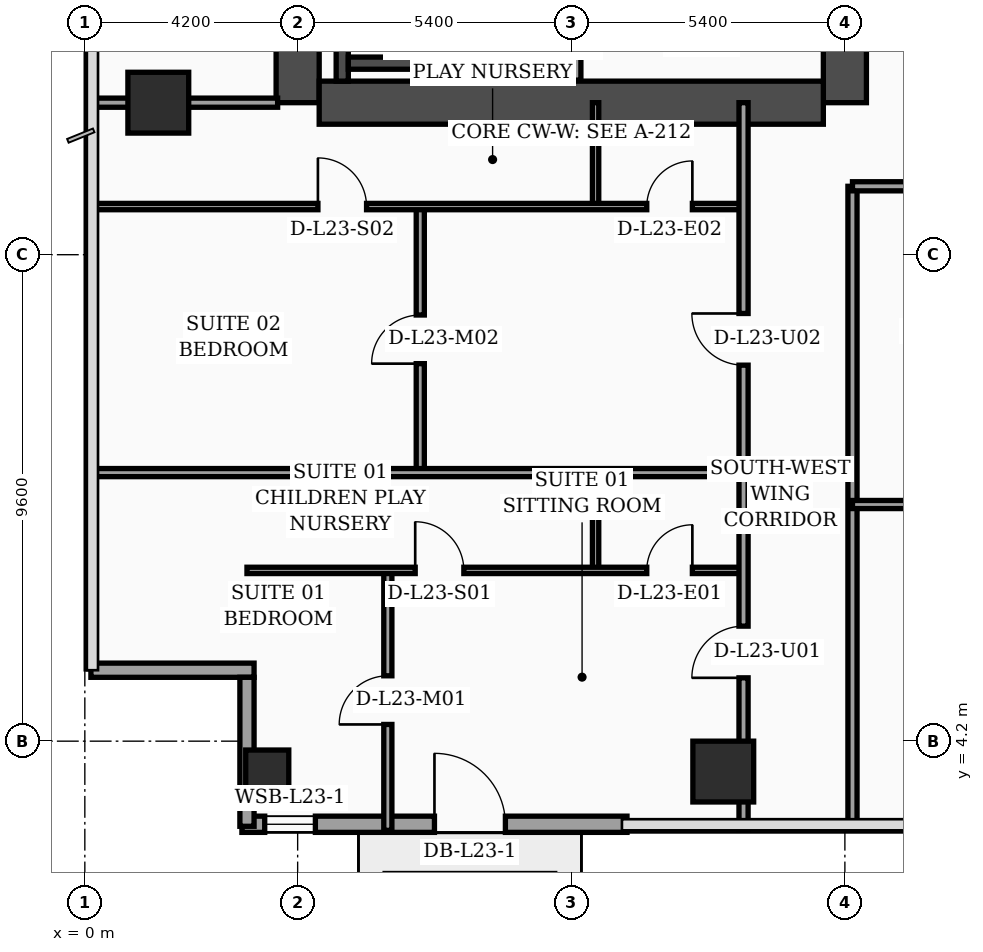
"""IFC4 building model, lengths in metres.
Left out: names, types, materials, properties, quantities, classifications, styles, units other than length and angle.
Written with IfcOpenShell. Run it as: python <this file> out.ifc"""

import sys

from ifc_helpers import new_model, si_unit, direction, frame, frame_2d, origin, origin_2d, place, context, subcontext, project, spatial, rectangle, hollow_rectangle, extrude, element, fill, save


model = new_model("IFC4")
c1 = context("Model", 3, precision=1e-05, world=origin(), true_north=direction((0.0, 1.0)))
c2 = subcontext(c1, "Body", "Model", "MODEL_VIEW")
j1 = project(units=[si_unit("LENGTHUNIT", "METRE"), si_unit("PLANEANGLEUNIT", "RADIAN")], contexts=[c1])
p1 = place(None, origin())
s1 = spatial("IfcSite", under=j1, at=p1, CompositionType="ELEMENT")
p2 = place(p1, origin())
s2 = spatial("IfcBuilding", under=s1, at=p2, CompositionType="ELEMENT")
p3 = place(p2, frame((0.0, 0.0, 97.4)))
s3 = spatial("IfcBuildingStorey", under=s2, at=p3, CompositionType="ELEMENT", Elevation=97.4)
p4 = place(p3, frame((4.2, 16.8, 0.0), z_axis=(0.0, 0.0, 1.0), x_axis=(0.0, 1.0, 0.0)))
e1 = element("IfcWall", 1, at=p4, inside=s3, PredefinedType="SHEAR", context=c2, shape_type="SweptSolid", body=[
    extrude(rectangle(XDim=21.6, YDim=0.85, at=frame_2d((10.8, 0.0))), origin(), (0.0, 0.0, 1.0), 3.56),
])
p5 = place(p3, frame((15.0, 16.8, 0.0), z_axis=(0.0, 0.0, 1.0), x_axis=(0.0, 1.0, 0.0)))
e2 = element("IfcWall", 2, at=p5, inside=s3, PredefinedType="SHEAR", context=c2, shape_type="SweptSolid", body=[
    extrude(rectangle(XDim=21.6, YDim=0.85, at=frame_2d((10.8, 0.0))), origin(), (0.0, 0.0, 1.0), 3.56),
])
p6 = place(p5, frame((8.65, 0.0, 0.0)))
e3 = element("IfcOpeningElement", 3, at=p6, cuts=e2, PredefinedType="OPENING", context=c2, shape_type="SweptSolid", body=[
    extrude(rectangle(XDim=1.1, YDim=2.2, at=frame_2d((0.55, 1.1))), frame((0.0, 0.435, 0.0), z_axis=(0.0, -1.0, 0.0), x_axis=(1.0, 0.0, 0.0)), (0.0, 0.0, 1.0), 0.87),
])
p7 = place(p5, frame((10.85, 0.0, 0.0)))
e4 = element("IfcOpeningElement", 4, at=p7, cuts=e2, PredefinedType="OPENING", context=c2, shape_type="SweptSolid", body=[
    extrude(rectangle(XDim=1.1, YDim=2.2, at=frame_2d((0.55, 1.1))), frame((0.0, 0.435, 0.0), z_axis=(0.0, -1.0, 0.0), x_axis=(1.0, 0.0, 0.0)), (0.0, 0.0, 1.0), 0.87),
])
p8 = place(p5, frame((13.5, 0.0, 0.0)))
e5 = element("IfcOpeningElement", 5, at=p8, cuts=e2, PredefinedType="OPENING", context=c2, shape_type="SweptSolid", body=[
    extrude(rectangle(XDim=1.1, YDim=2.2, at=frame_2d((0.55, 1.1))), frame((0.0, 0.435, 0.0), z_axis=(0.0, -1.0, 0.0), x_axis=(1.0, 0.0, 0.0)), (0.0, 0.0, 1.0), 0.87),
])
p9 = place(p5, frame((16.15, 0.0, 0.0)))
e6 = element("IfcOpeningElement", 6, at=p9, cuts=e2, PredefinedType="OPENING", context=c2, shape_type="SweptSolid", body=[
    extrude(rectangle(XDim=1.1, YDim=2.2, at=frame_2d((0.55, 1.1))), frame((0.0, 0.435, 0.0), z_axis=(0.0, -1.0, 0.0), x_axis=(1.0, 0.0, 0.0)), (0.0, 0.0, 1.0), 0.87),
])
p10 = place(p3, frame((4.625, 16.8, 0.0), z_axis=(0.0, 0.0, 1.0), x_axis=(1.0, 0.0, 0.0)))
e7 = element("IfcWall", 7, at=p10, inside=s3, PredefinedType="SHEAR", context=c2, shape_type="SweptSolid", body=[
    extrude(rectangle(XDim=9.95, YDim=0.85, at=frame_2d((4.975, 0.0))), origin(), (0.0, 0.0, 1.0), 3.56),
])
p11 = place(p3, frame((5.08, 17.225, 0.0), z_axis=(0.0, 0.0, 1.0), x_axis=(0.0, 1.0, 0.0)))
e8 = element("IfcWall", 8, at=p11, inside=s3, PredefinedType="SOLIDWALL", context=c2, shape_type="SweptSolid", body=[
    extrude(rectangle(XDim=9.565, YDim=0.24, at=frame_2d((4.782, 0.0))), origin(), (0.0, 0.0, 1.0), 3.56),
])
p12 = place(p3, frame((8.42, 17.225, 0.0), z_axis=(0.0, 0.0, 1.0), x_axis=(0.0, 1.0, 0.0)))
e9 = element("IfcWall", 9, at=p12, inside=s3, PredefinedType="SOLIDWALL", context=c2, shape_type="SweptSolid", body=[
    extrude(rectangle(XDim=9.565, YDim=0.24, at=frame_2d((4.782, 0.0))), origin(), (0.0, 0.0, 1.0), 3.56),
])
p13 = place(p12, frame((0.35, 0.0, 0.0)))
e10 = element("IfcOpeningElement", 10, at=p13, cuts=e9, PredefinedType="OPENING", context=c2, shape_type="SweptSolid", body=[
    extrude(rectangle(XDim=1.15, YDim=2.2, at=frame_2d((0.575, 1.1))), frame((0.0, 0.13, 0.0), z_axis=(0.0, -1.0, 0.0), x_axis=(1.0, 0.0, 0.0)), (0.0, 0.0, 1.0), 0.26),
])
p14 = place(p3, frame((5.2, 17.58, 0.0), z_axis=(0.0, 0.0, 1.0), x_axis=(1.0, 0.0, 0.0)))
e11 = element("IfcWall", 11, at=p14, inside=s3, PredefinedType="SOLIDWALL", context=c2, shape_type="SweptSolid", body=[
    extrude(rectangle(XDim=3.1, YDim=0.24, at=frame_2d((1.55, 0.0))), origin(), (0.0, 0.0, 1.0), 3.56),
])
p15 = place(p3, frame((3.6, 3.6, 0.0), z_axis=(0.0, 0.0, 1.0), x_axis=(1.0, 0.0, 0.0)))
e12 = element("IfcColumn", 12, at=p15, inside=s3, PredefinedType="COLUMN", context=c2, shape_type="SweptSolid", body=[
    extrude(hollow_rectangle(XDim=0.85, YDim=0.85, WallThickness=0.036, at=origin_2d()), origin(), (0.0, 0.0, 1.0), 3.56),
])
for number, where, z_axis, x_axis in (
    (13, (1.45, 16.8, 0.0), (0.0, 0.0, 1.0), (1.0, 0.0, 0.0)),
    (14, (12.6, 3.6, 0.0), (0.0, 0.0, 1.0), (1.0, 0.0, 0.0)),
):
    element("IfcColumn", number, at=place(p3, frame(where, z_axis=z_axis, x_axis=x_axis)), inside=s3, PredefinedType="COLUMN", context=c2, shape_type="SweptSolid", body=[
        extrude(rectangle(XDim=1.2, YDim=1.2, at=origin_2d()), origin(), (0.0, 0.0, 1.0), 3.56),
    ])
p16 = place(p3, frame((3.1, 2.56, 0.0), z_axis=(0.0, 0.0, 1.0), x_axis=(1.0, 0.0, 0.0)))
e15 = element("IfcWall", 15, at=p16, inside=s3, PredefinedType="SOLIDWALL", context=c2, shape_type="SweptSolid", body=[
    extrude(rectangle(XDim=7.6, YDim=0.32, at=frame_2d((3.8, 0.0))), origin(), (0.0, 0.0, 1.0), 3.56),
])
p17 = place(p16, frame((0.45, 0.0, 0.75)))
e16 = element("IfcOpeningElement", 16, at=p17, cuts=e15, PredefinedType="OPENING", context=c2, shape_type="SweptSolid", body=[
    extrude(rectangle(XDim=1.0, YDim=1.6, at=frame_2d((0.5, 0.8))), frame((0.0, 0.17, 0.0), z_axis=(0.0, -1.0, 0.0), x_axis=(1.0, 0.0, 0.0)), (0.0, 0.0, 1.0), 0.34),
])
p18 = place(p16, frame((3.8, 0.0, 0.0)))
e17 = element("IfcOpeningElement", 17, at=p18, cuts=e15, PredefinedType="OPENING", context=c2, shape_type="SweptSolid", body=[
    extrude(rectangle(XDim=1.4, YDim=2.25, at=frame_2d((0.7, 1.125))), frame((0.0, 0.17, 0.0), z_axis=(0.0, -1.0, 0.0), x_axis=(1.0, 0.0, 0.0)), (0.0, 0.0, 1.0), 0.34),
])
p19 = place(p3, frame((0.12, 5.6, 0.0), z_axis=(0.0, 0.0, 1.0), x_axis=(1.0, 0.0, 0.0)))
e18 = element("IfcWall", 18, at=p19, inside=s3, PredefinedType="SOLIDWALL", context=c2, shape_type="SweptSolid", body=[
    extrude(rectangle(XDim=3.22, YDim=0.28, at=frame_2d((1.61, 0.0))), origin(), (0.0, 0.0, 1.0), 2.84),
])
p20 = place(p3, frame((3.2, 5.46, 0.0), z_axis=(0.0, 0.0, 1.0), x_axis=(0.0, -1.0, 0.0)))
e19 = element("IfcWall", 19, at=p20, inside=s3, PredefinedType="SOLIDWALL", context=c2, shape_type="SweptSolid", body=[
    extrude(rectangle(XDim=2.94, YDim=0.28, at=frame_2d((1.47, 0.0))), origin(), (0.0, 0.0, 1.0), 2.84),
])
p21 = place(p3, frame((9.68, 17.245, 0.0), z_axis=(0.0, 0.0, 1.0), x_axis=(0.0, 1.0, 0.0)))
e20 = element("IfcWall", 20, at=p21, inside=s3, PredefinedType="SOLIDWALL", context=c2, shape_type="SweptSolid", body=[
    extrude(rectangle(XDim=7.755, YDim=0.22, at=frame_2d((3.877, 0.0))), origin(), (0.0, 0.0, 1.0), 3.56),
])
p22 = place(p3, frame((0.08, 16.8, 0.0), z_axis=(0.0, 0.0, 1.0), x_axis=(1.0, 0.0, 0.0)))
e21 = element("IfcWall", 21, at=p22, inside=s3, PredefinedType="PARTITIONING", context=c2, shape_type="SweptSolid", body=[
    extrude(rectangle(XDim=3.725, YDim=0.18, at=frame_2d((1.862, 0.0))), origin(), (0.0, 0.0, 1.0), 2.84),
])
p23 = place(p3, frame((10.08, 7.57, 0.0), z_axis=(0.0, 0.0, 1.0), x_axis=(0.0, 1.0, 0.0)))
e22 = element("IfcWall", 22, at=p23, inside=s3, PredefinedType="PARTITIONING", context=c2, shape_type="SweptSolid", body=[
    extrude(rectangle(XDim=1.93, YDim=0.125, at=frame_2d((0.965, 0.0))), origin(), (0.0, 0.0, 1.0), 3.09),
])
p24 = place(p3, frame((5.98, 2.44, 0.0), z_axis=(0.0, 0.0, 1.0), x_axis=(0.0, 1.0, 0.0)))
e23 = element("IfcWall", 23, at=p24, inside=s3, PredefinedType="PARTITIONING", context=c2, shape_type="SweptSolid", body=[
    extrude(rectangle(XDim=5.13, YDim=0.16, at=frame_2d((2.565, 0.0))), origin(), (0.0, 0.0, 1.0), 3.04),
])
p25 = place(p24, frame((2.09, 0.0, 0.0)))
e24 = element("IfcOpeningElement", 24, at=p25, cuts=e23, PredefinedType="OPENING", context=c2, shape_type="SweptSolid", body=[
    extrude(rectangle(XDim=0.96, YDim=2.2, at=frame_2d((0.48, 1.1))), frame((0.0, 0.09, 0.0), z_axis=(0.0, -1.0, 0.0), x_axis=(1.0, 0.0, 0.0)), (0.0, 0.0, 1.0), 0.18),
])
p26 = place(p3, frame((3.2, 7.57, 0.0), z_axis=(0.0, 0.0, 1.0), x_axis=(1.0, 0.0, 0.0)))
e25 = element("IfcWall", 25, at=p26, inside=s3, PredefinedType="PARTITIONING", context=c2, shape_type="SweptSolid", body=[
    extrude(rectangle(XDim=9.8, YDim=0.125, at=frame_2d((4.9, 0.0))), origin(), (0.0, 0.0, 1.0), 2.84),
])
p27 = place(p26, frame((3.32, 0.0, 0.0)))
e26 = element("IfcOpeningElement", 26, at=p27, cuts=e25, PredefinedType="OPENING", context=c2, shape_type="SweptSolid", body=[
    extrude(rectangle(XDim=0.96, YDim=2.2, at=frame_2d((0.48, 1.1))), frame((0.0, 0.073, 0.0), z_axis=(0.0, -1.0, 0.0), x_axis=(1.0, 0.0, 0.0)), (0.0, 0.0, 1.0), 0.145),
])
p28 = place(p26, frame((7.89, 0.0, 0.0)))
e27 = element("IfcOpeningElement", 27, at=p28, cuts=e25, PredefinedType="OPENING", context=c2, shape_type="SweptSolid", body=[
    extrude(rectangle(XDim=0.9, YDim=2.15, at=frame_2d((0.45, 1.075))), frame((0.0, 0.073, 0.0), z_axis=(0.0, -1.0, 0.0), x_axis=(1.0, 0.0, 0.0)), (0.0, 0.0, 1.0), 0.145),
])
p29 = place(p3, frame((10.08, 14.75, 0.0), z_axis=(0.0, 0.0, 1.0), x_axis=(0.0, 1.0, 0.0)))
e28 = element("IfcWall", 28, at=p29, inside=s3, PredefinedType="PARTITIONING", context=c2, shape_type="SweptSolid", body=[
    extrude(rectangle(XDim=2.05, YDim=0.125, at=frame_2d((1.025, 0.0))), origin(), (0.0, 0.0, 1.0), 3.56),
])
p30 = place(p3, frame((6.62, 9.5, 0.0), z_axis=(0.0, 0.0, 1.0), x_axis=(0.0, 1.0, 0.0)))
e29 = element("IfcWall", 29, at=p30, inside=s3, PredefinedType="PARTITIONING", context=c2, shape_type="SweptSolid", body=[
    extrude(rectangle(XDim=5.25, YDim=0.16, at=frame_2d((2.625, 0.0))), origin(), (0.0, 0.0, 1.0), 3.14),
])
p31 = place(p30, frame((2.15, 0.0, 0.0)))
e30 = element("IfcOpeningElement", 30, at=p31, cuts=e29, PredefinedType="OPENING", context=c2, shape_type="SweptSolid", body=[
    extrude(rectangle(XDim=0.96, YDim=2.2, at=frame_2d((0.48, 1.1))), frame((0.0, 0.09, 0.0), z_axis=(0.0, -1.0, 0.0), x_axis=(1.0, 0.0, 0.0)), (0.0, 0.0, 1.0), 0.18),
])
p32 = place(p3, frame((0.08, 14.75, 0.0), z_axis=(0.0, 0.0, 1.0), x_axis=(1.0, 0.0, 0.0)))
e31 = element("IfcWall", 31, at=p32, inside=s3, PredefinedType="PARTITIONING", context=c2, shape_type="SweptSolid", body=[
    extrude(rectangle(XDim=12.92, YDim=0.125, at=frame_2d((6.46, 0.0))), origin(), (0.0, 0.0, 1.0), 2.84),
])
p33 = place(p32, frame((4.52, 0.0, 0.0)))
e32 = element("IfcOpeningElement", 32, at=p33, cuts=e31, PredefinedType="OPENING", context=c2, shape_type="SweptSolid", body=[
    extrude(rectangle(XDim=0.96, YDim=2.2, at=frame_2d((0.48, 1.1))), frame((0.0, 0.073, 0.0), z_axis=(0.0, -1.0, 0.0), x_axis=(1.0, 0.0, 0.0)), (0.0, 0.0, 1.0), 0.145),
])
p34 = place(p32, frame((11.01, 0.0, 0.0)))
e33 = element("IfcOpeningElement", 33, at=p34, cuts=e31, PredefinedType="OPENING", context=c2, shape_type="SweptSolid", body=[
    extrude(rectangle(XDim=0.9, YDim=2.15, at=frame_2d((0.45, 1.075))), frame((0.0, 0.073, 0.0), z_axis=(0.0, -1.0, 0.0), x_axis=(1.0, 0.0, 0.0)), (0.0, 0.0, 1.0), 0.145),
])
p35 = place(p3, frame((0.08, 9.5, 0.0), z_axis=(0.0, 0.0, 1.0), x_axis=(1.0, 0.0, 0.0)))
e34 = element("IfcWall", 34, at=p35, inside=s3, PredefinedType="PARTITIONING", context=c2, shape_type="SweptSolid", body=[
    extrude(rectangle(XDim=12.92, YDim=0.16, at=frame_2d((6.46, 0.0))), origin(), (0.0, 0.0, 1.0), 2.84),
])
p36 = place(p3, frame((13.0, 2.44, 0.0), z_axis=(0.0, 0.0, 1.0), x_axis=(0.0, 1.0, 0.0)))
e35 = element("IfcWall", 35, at=p36, inside=s3, PredefinedType="PARTITIONING", context=c2, shape_type="SweptSolid", body=[
    extrude(rectangle(XDim=14.36, YDim=0.18, at=frame_2d((7.18, 0.0))), origin(), (0.0, 0.0, 1.0), 2.84),
])
p37 = place(p36, frame((3.01, 0.0, 0.0)))
e36 = element("IfcOpeningElement", 36, at=p37, cuts=e35, PredefinedType="OPENING", context=c2, shape_type="SweptSolid", body=[
    extrude(rectangle(XDim=1.02, YDim=2.2, at=frame_2d((0.51, 1.1))), frame((0.0, 0.1, 0.0), z_axis=(0.0, -1.0, 0.0), x_axis=(1.0, 0.0, 0.0)), (0.0, 0.0, 1.0), 0.2),
])
p38 = place(p36, frame((9.18, 0.0, 0.0)))
e37 = element("IfcOpeningElement", 37, at=p38, cuts=e35, PredefinedType="OPENING", context=c2, shape_type="SweptSolid", body=[
    extrude(rectangle(XDim=1.02, YDim=2.2, at=frame_2d((0.51, 1.1))), frame((0.0, 0.1, 0.0), z_axis=(0.0, -1.0, 0.0), x_axis=(1.0, 0.0, 0.0)), (0.0, 0.0, 1.0), 0.2),
])
p39 = place(p3, frame((15.15, 2.44, 0.0), z_axis=(0.0, 0.0, 1.0), x_axis=(0.0, 1.0, 0.0)))
e38 = element("IfcWall", 38, at=p39, inside=s3, PredefinedType="PARTITIONING", context=c2, shape_type="SweptSolid", body=[
    extrude(rectangle(XDim=12.71, YDim=0.18, at=frame_2d((6.355, 0.0))), origin(), (0.0, 0.0, 1.0), 3.04),
])
p40 = place(p3, frame((15.15, 8.87, 0.0), z_axis=(0.0, 0.0, 1.0), x_axis=(1.0, 0.0, 0.0)))
e39 = element("IfcWall", 39, at=p40, inside=s3, PredefinedType="PARTITIONING", context=c2, shape_type="SweptSolid", body=[
    extrude(rectangle(XDim=4.45, YDim=0.16, at=frame_2d((2.225, 0.0))), origin(), (0.0, 0.0, 1.0), 3.56),
])
p41 = place(p40, frame((1.75, 0.0, 0.0)))
e40 = element("IfcOpeningElement", 40, at=p41, cuts=e39, PredefinedType="OPENING", context=c2, shape_type="SweptSolid", body=[
    extrude(rectangle(XDim=0.96, YDim=2.2, at=frame_2d((0.48, 1.1))), frame((0.0, 0.09, 0.0), z_axis=(0.0, -1.0, 0.0), x_axis=(1.0, 0.0, 0.0)), (0.0, 0.0, 1.0), 0.18),
])
p42 = place(p3, frame((15.15, 15.15, 0.0), z_axis=(0.0, 0.0, 1.0), x_axis=(1.0, 0.0, 0.0)))
e41 = element("IfcWall", 41, at=p42, inside=s3, PredefinedType="PARTITIONING", context=c2, shape_type="SweptSolid", body=[
    extrude(rectangle(XDim=6.45, YDim=0.18, at=frame_2d((3.225, 0.0))), origin(), (0.0, 0.0, 1.0), 2.49),
])
p43 = place(p42, frame((1.74, 0.0, 0.0)))
e42 = element("IfcOpeningElement", 42, at=p43, cuts=e41, PredefinedType="OPENING", context=c2, shape_type="SweptSolid", body=[
    extrude(rectangle(XDim=1.02, YDim=2.2, at=frame_2d((0.51, 1.1))), frame((0.0, 0.1, 0.0), z_axis=(0.0, -1.0, 0.0), x_axis=(1.0, 0.0, 0.0)), (0.0, 0.0, 1.0), 0.2),
])
p44 = place(p17, origin())
e43 = element("IfcWindow", 43, at=p44, inside=s3, PartitioningType="SINGLE_PANEL", PredefinedType="WINDOW", context=c2, shape_type="SweptSolid", body=[
    extrude(rectangle(XDim=1.0, YDim=1.6, at=frame_2d((0.5, 0.8))), frame((0.0, 0.03, 0.0), z_axis=(0.0, -1.0, 0.0), x_axis=(1.0, 0.0, 0.0)), (0.0, 0.0, 1.0), 0.06),
])
fill(e16, e43)
p45 = place(p18, origin())
e44 = element("IfcDoor", 44, at=p45, inside=s3, OperationType="SINGLE_SWING_LEFT", PredefinedType="DOOR", context=c2, shape_type="SweptSolid", body=[
    extrude(rectangle(XDim=1.4, YDim=2.25, at=frame_2d((0.7, 1.125))), frame((0.0, 0.025, 0.0), z_axis=(0.0, -1.0, 0.0), x_axis=(1.0, 0.0, 0.0)), (0.0, 0.0, 1.0), 0.05),
])
fill(e17, e44)
p46 = place(p25, origin())
e45 = element("IfcDoor", 45, at=p46, inside=s3, OperationType="SINGLE_SWING_LEFT", PredefinedType="DOOR", context=c2, shape_type="SweptSolid", body=[
    extrude(rectangle(XDim=0.96, YDim=2.2, at=frame_2d((0.48, 1.1))), frame((0.0, 0.025, 0.0), z_axis=(0.0, -1.0, 0.0), x_axis=(1.0, 0.0, 0.0)), (0.0, 0.0, 1.0), 0.05),
])
fill(e24, e45)
p47 = place(p27, origin())
e46 = element("IfcDoor", 46, at=p47, inside=s3, OperationType="SINGLE_SWING_LEFT", PredefinedType="DOOR", context=c2, shape_type="SweptSolid", body=[
    extrude(rectangle(XDim=0.96, YDim=2.2, at=frame_2d((0.48, 1.1))), frame((0.0, 0.025, 0.0), z_axis=(0.0, -1.0, 0.0), x_axis=(1.0, 0.0, 0.0)), (0.0, 0.0, 1.0), 0.05),
])
fill(e26, e46)
p48 = place(p28, origin())
e47 = element("IfcDoor", 47, at=p48, inside=s3, OperationType="SINGLE_SWING_RIGHT", PredefinedType="DOOR", context=c2, shape_type="SweptSolid", body=[
    extrude(rectangle(XDim=0.9, YDim=2.15, at=frame_2d((0.45, 1.075))), frame((0.0, 0.025, 0.0), z_axis=(0.0, -1.0, 0.0), x_axis=(1.0, 0.0, 0.0)), (0.0, 0.0, 1.0), 0.05),
])
fill(e27, e47)
p49 = place(p31, origin())
e48 = element("IfcDoor", 48, at=p49, inside=s3, OperationType="SINGLE_SWING_LEFT", PredefinedType="DOOR", context=c2, shape_type="SweptSolid", body=[
    extrude(rectangle(XDim=0.96, YDim=2.2, at=frame_2d((0.48, 1.1))), frame((0.0, 0.025, 0.0), z_axis=(0.0, -1.0, 0.0), x_axis=(1.0, 0.0, 0.0)), (0.0, 0.0, 1.0), 0.05),
])
fill(e30, e48)
p50 = place(p33, origin())
e49 = element("IfcDoor", 49, at=p50, inside=s3, OperationType="SINGLE_SWING_LEFT", PredefinedType="DOOR", context=c2, shape_type="SweptSolid", body=[
    extrude(rectangle(XDim=0.96, YDim=2.2, at=frame_2d((0.48, 1.1))), frame((0.0, 0.025, 0.0), z_axis=(0.0, -1.0, 0.0), x_axis=(1.0, 0.0, 0.0)), (0.0, 0.0, 1.0), 0.05),
])
fill(e32, e49)
p51 = place(p34, origin())
e50 = element("IfcDoor", 50, at=p51, inside=s3, OperationType="SINGLE_SWING_RIGHT", PredefinedType="DOOR", context=c2, shape_type="SweptSolid", body=[
    extrude(rectangle(XDim=0.9, YDim=2.15, at=frame_2d((0.45, 1.075))), frame((0.0, 0.025, 0.0), z_axis=(0.0, -1.0, 0.0), x_axis=(1.0, 0.0, 0.0)), (0.0, 0.0, 1.0), 0.05),
])
fill(e33, e50)
p52 = place(p37, origin())
e51 = element("IfcDoor", 51, at=p52, inside=s3, OperationType="SINGLE_SWING_LEFT", PredefinedType="DOOR", context=c2, shape_type="SweptSolid", body=[
    extrude(rectangle(XDim=1.02, YDim=2.2, at=frame_2d((0.51, 1.1))), frame((0.0, 0.025, 0.0), z_axis=(0.0, -1.0, 0.0), x_axis=(1.0, 0.0, 0.0)), (0.0, 0.0, 1.0), 0.05),
])
fill(e36, e51)
p53 = place(p38, origin())
e52 = element("IfcDoor", 52, at=p53, inside=s3, OperationType="SINGLE_SWING_RIGHT", PredefinedType="DOOR", context=c2, shape_type="SweptSolid", body=[
    extrude(rectangle(XDim=1.02, YDim=2.2, at=frame_2d((0.51, 1.1))), frame((0.0, 0.025, 0.0), z_axis=(0.0, -1.0, 0.0), x_axis=(1.0, 0.0, 0.0)), (0.0, 0.0, 1.0), 0.05),
])
fill(e37, e52)
p54 = place(p13, origin())
e53 = element("IfcDoor", 53, at=p54, inside=s3, OperationType="SINGLE_SWING_LEFT", PredefinedType="DOOR", context=c2, shape_type="SweptSolid", body=[
    extrude(rectangle(XDim=1.15, YDim=2.2, at=frame_2d((0.575, 1.1))), frame((0.0, 0.025, 0.0), z_axis=(0.0, -1.0, 0.0), x_axis=(1.0, 0.0, 0.0)), (0.0, 0.0, 1.0), 0.05),
])
fill(e10, e53)
save(model, sys.argv[1])
